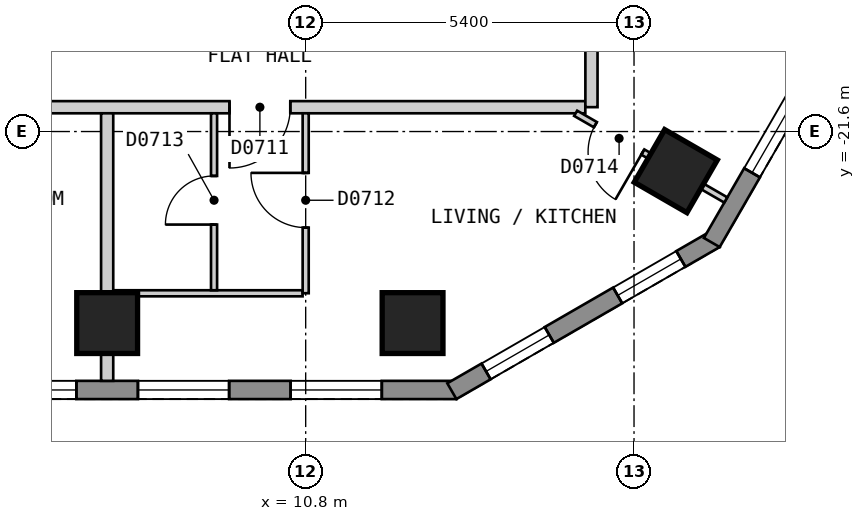
"""IFC4 building model, lengths in metres.
Left out: names, types, materials, properties, quantities, classifications, styles, units other than length and angle.
Written with IfcOpenShell. Run it as: python <this file> out.ifc"""

import sys

from ifc_helpers import new_model, si_unit, direction, frame, frame_2d, origin, origin_2d, place, context, subcontext, project, spatial, polyline, rectangle, outline, extrude, element, fill, save


model = new_model("IFC4")
c1 = context("Model", 3, precision=1e-05, world=origin(), true_north=direction((0.0, 1.0)))
c2 = subcontext(c1, "Body", "Model", "MODEL_VIEW")
j1 = project(units=[si_unit("LENGTHUNIT", "METRE"), si_unit("PLANEANGLEUNIT", "RADIAN")], contexts=[c1])
p1 = place(None, origin())
s1 = spatial("IfcSite", under=j1, at=p1, CompositionType="ELEMENT")
p2 = place(p1, origin())
s2 = spatial("IfcBuilding", under=s1, at=p2, CompositionType="ELEMENT")
p3 = place(p2, frame((0.0, 0.0, 99.0)))
s3 = spatial("IfcBuildingStorey", under=s2, at=p3, CompositionType="ELEMENT", Elevation=99.0)
for number, where, z_axis, x_axis in (
    (1, (7.535, -24.75, 0.0), (0.0, 0.0, 1.0), (1.0, 0.0, 0.0)),
    (2, (12.558, -24.75, 0.0), (0.0, 0.0, 1.0), (1.0, 0.0, 0.0)),
    (3, (16.887, -22.251, 0.0), (0.0, 0.0, 1.0), (0.5, 0.866, 0.0)),
):
    element("IfcColumn", number, at=place(p3, frame(where, z_axis=z_axis, x_axis=x_axis)), inside=s3, PredefinedType="COLUMN", context=c2, shape_type="SweptSolid", body=[
        extrude(rectangle(XDim=1.0, YDim=1.0, at=origin_2d()), origin(), (0.0, 0.0, 1.0), 3.0),
    ])
p4 = place(p3, frame((-13.279, -25.85, 0.0), z_axis=(0.0, 0.0, 1.0), x_axis=(1.0, 0.0, 0.0)))
e4 = element("IfcWall", 4, at=p4, inside=s3, PredefinedType="SOLIDWALL", context=c2, shape_type="SweptSolid", body=[
    extrude(outline(polyline([(0.0, -0.15), (26.558, -0.15), (26.478, 0.15), (0.08, 0.15), (0.0, -0.15)])), origin(), (0.0, 0.0, 1.0), 2.7),
])
p5 = place(p4, frame((1.228, 0.0, 0.15)))
e5 = element("IfcOpeningElement", 5, at=p5, cuts=e4, PredefinedType="OPENING", context=c2, shape_type="SweptSolid", body=[
    extrude(rectangle(XDim=1.5, YDim=2.1, at=frame_2d((0.75, 1.05))), frame((0.0, 0.16, 0.0), z_axis=(0.0, -1.0, 0.0), x_axis=(1.0, 0.0, 0.0)), (0.0, 0.0, 1.0), 0.32),
])
p6 = place(p4, frame((3.739, 0.0, 0.15)))
e6 = element("IfcOpeningElement", 6, at=p6, cuts=e4, PredefinedType="OPENING", context=c2, shape_type="SweptSolid", body=[
    extrude(rectangle(XDim=1.5, YDim=2.1, at=frame_2d((0.75, 1.05))), frame((0.0, 0.16, 0.0), z_axis=(0.0, -1.0, 0.0), x_axis=(1.0, 0.0, 0.0)), (0.0, 0.0, 1.0), 0.32),
])
p7 = place(p4, frame((6.251, 0.0, 0.15)))
e7 = element("IfcOpeningElement", 7, at=p7, cuts=e4, PredefinedType="OPENING", context=c2, shape_type="SweptSolid", body=[
    extrude(rectangle(XDim=1.5, YDim=2.1, at=frame_2d((0.75, 1.05))), frame((0.0, 0.16, 0.0), z_axis=(0.0, -1.0, 0.0), x_axis=(1.0, 0.0, 0.0)), (0.0, 0.0, 1.0), 0.32),
])
p8 = place(p4, frame((8.762, 0.0, 0.15)))
e8 = element("IfcOpeningElement", 8, at=p8, cuts=e4, PredefinedType="OPENING", context=c2, shape_type="SweptSolid", body=[
    extrude(rectangle(XDim=1.5, YDim=2.1, at=frame_2d((0.75, 1.05))), frame((0.0, 0.16, 0.0), z_axis=(0.0, -1.0, 0.0), x_axis=(1.0, 0.0, 0.0)), (0.0, 0.0, 1.0), 0.32),
])
p9 = place(p4, frame((11.274, 0.0, 0.15)))
e9 = element("IfcOpeningElement", 9, at=p9, cuts=e4, PredefinedType="OPENING", context=c2, shape_type="SweptSolid", body=[
    extrude(rectangle(XDim=1.5, YDim=2.1, at=frame_2d((0.75, 1.05))), frame((0.0, 0.16, 0.0), z_axis=(0.0, -1.0, 0.0), x_axis=(1.0, 0.0, 0.0)), (0.0, 0.0, 1.0), 0.32),
])
p10 = place(p4, frame((13.785, 0.0, 0.15)))
e10 = element("IfcOpeningElement", 10, at=p10, cuts=e4, PredefinedType="OPENING", context=c2, shape_type="SweptSolid", body=[
    extrude(rectangle(XDim=1.5, YDim=2.1, at=frame_2d((0.75, 1.05))), frame((0.0, 0.16, 0.0), z_axis=(0.0, -1.0, 0.0), x_axis=(1.0, 0.0, 0.0)), (0.0, 0.0, 1.0), 0.32),
])
p11 = place(p4, frame((16.297, 0.0, 0.15)))
e11 = element("IfcOpeningElement", 11, at=p11, cuts=e4, PredefinedType="OPENING", context=c2, shape_type="SweptSolid", body=[
    extrude(rectangle(XDim=1.5, YDim=2.1, at=frame_2d((0.75, 1.05))), frame((0.0, 0.16, 0.0), z_axis=(0.0, -1.0, 0.0), x_axis=(1.0, 0.0, 0.0)), (0.0, 0.0, 1.0), 0.32),
])
p12 = place(p4, frame((18.808, 0.0, 0.15)))
e12 = element("IfcOpeningElement", 12, at=p12, cuts=e4, PredefinedType="OPENING", context=c2, shape_type="SweptSolid", body=[
    extrude(rectangle(XDim=1.5, YDim=2.1, at=frame_2d((0.75, 1.05))), frame((0.0, 0.16, 0.0), z_axis=(0.0, -1.0, 0.0), x_axis=(1.0, 0.0, 0.0)), (0.0, 0.0, 1.0), 0.32),
])
p13 = place(p4, frame((21.32, 0.0, 0.15)))
e13 = element("IfcOpeningElement", 13, at=p13, cuts=e4, PredefinedType="OPENING", context=c2, shape_type="SweptSolid", body=[
    extrude(rectangle(XDim=1.5, YDim=2.1, at=frame_2d((0.75, 1.05))), frame((0.0, 0.16, 0.0), z_axis=(0.0, -1.0, 0.0), x_axis=(1.0, 0.0, 0.0)), (0.0, 0.0, 1.0), 0.32),
])
p14 = place(p4, frame((23.831, 0.0, 0.15)))
e14 = element("IfcOpeningElement", 14, at=p14, cuts=e4, PredefinedType="OPENING", context=c2, shape_type="SweptSolid", body=[
    extrude(rectangle(XDim=1.5, YDim=2.1, at=frame_2d((0.75, 1.05))), frame((0.0, 0.16, 0.0), z_axis=(0.0, -1.0, 0.0), x_axis=(1.0, 0.0, 0.0)), (0.0, 0.0, 1.0), 0.32),
])
p15 = place(p3, frame((13.204, -25.87, 0.0), z_axis=(0.0, 0.0, 1.0), x_axis=(0.866010750942, 0.50002537861, 0.0)))
e15 = element("IfcWall", 15, at=p15, inside=s3, PredefinedType="SOLIDWALL", context=c2, shape_type="SweptSolid", body=[
    extrude(outline(polyline([(0.0, -0.15), (5.0, -0.15), (4.919, 0.15), (0.08, 0.15), (0.0, -0.15)])), origin(), (0.0, 0.0, 1.0), 2.7),
])
p16 = place(p15, frame((0.65, 0.0, 0.15)))
e16 = element("IfcOpeningElement", 16, at=p16, cuts=e15, PredefinedType="OPENING", context=c2, shape_type="SweptSolid", body=[
    extrude(rectangle(XDim=1.2, YDim=2.1, at=frame_2d((0.6, 1.05))), frame((0.0, 0.16, 0.0), z_axis=(0.0, -1.0, 0.0), x_axis=(1.0, 0.0, 0.0)), (0.0, 0.0, 1.0), 0.32),
])
p17 = place(p15, frame((3.149, 0.0, 0.15)))
e17 = element("IfcOpeningElement", 17, at=p17, cuts=e15, PredefinedType="OPENING", context=c2, shape_type="SweptSolid", body=[
    extrude(rectangle(XDim=1.2, YDim=2.1, at=frame_2d((0.6, 1.05))), frame((0.0, 0.16, 0.0), z_axis=(0.0, -1.0, 0.0), x_axis=(1.0, 0.0, 0.0)), (0.0, 0.0, 1.0), 0.32),
])
p18 = place(p3, frame((17.479, -23.425, 0.0), z_axis=(0.0, 0.0, 1.0), x_axis=(0.500035407905, 0.866004960056, 0.0)))
e18 = element("IfcWall", 18, at=p18, inside=s3, PredefinedType="SOLIDWALL", context=c2, shape_type="SweptSolid", body=[
    extrude(outline(polyline([(0.0, -0.15), (23.094, -0.15), (23.014, 0.15), (0.08, 0.15), (0.0, -0.15)])), origin(), (0.0, 0.0, 1.0), 2.7),
])
p19 = place(p18, frame((1.324, 0.0, 0.15)))
e19 = element("IfcOpeningElement", 19, at=p19, cuts=e18, PredefinedType="OPENING", context=c2, shape_type="SweptSolid", body=[
    extrude(rectangle(XDim=1.5, YDim=2.1, at=frame_2d((0.75, 1.05))), frame((0.0, 0.16, 0.0), z_axis=(0.0, -1.0, 0.0), x_axis=(1.0, 0.0, 0.0)), (0.0, 0.0, 1.0), 0.32),
])
p20 = place(p18, frame((4.031, 0.0, 0.15)))
e20 = element("IfcOpeningElement", 20, at=p20, cuts=e18, PredefinedType="OPENING", context=c2, shape_type="SweptSolid", body=[
    extrude(rectangle(XDim=1.5, YDim=2.1, at=frame_2d((0.75, 1.05))), frame((0.0, 0.16, 0.0), z_axis=(0.0, -1.0, 0.0), x_axis=(1.0, 0.0, 0.0)), (0.0, 0.0, 1.0), 0.32),
])
p21 = place(p18, frame((6.737, 0.0, 0.15)))
e21 = element("IfcOpeningElement", 21, at=p21, cuts=e18, PredefinedType="OPENING", context=c2, shape_type="SweptSolid", body=[
    extrude(rectangle(XDim=1.5, YDim=2.1, at=frame_2d((0.75, 1.05))), frame((0.0, 0.16, 0.0), z_axis=(0.0, -1.0, 0.0), x_axis=(1.0, 0.0, 0.0)), (0.0, 0.0, 1.0), 0.32),
])
p22 = place(p18, frame((9.444, 0.0, 0.15)))
e22 = element("IfcOpeningElement", 22, at=p22, cuts=e18, PredefinedType="OPENING", context=c2, shape_type="SweptSolid", body=[
    extrude(rectangle(XDim=1.5, YDim=2.1, at=frame_2d((0.75, 1.05))), frame((0.0, 0.16, 0.0), z_axis=(0.0, -1.0, 0.0), x_axis=(1.0, 0.0, 0.0)), (0.0, 0.0, 1.0), 0.32),
])
p23 = place(p18, frame((12.151, 0.0, 0.15)))
e23 = element("IfcOpeningElement", 23, at=p23, cuts=e18, PredefinedType="OPENING", context=c2, shape_type="SweptSolid", body=[
    extrude(rectangle(XDim=1.5, YDim=2.1, at=frame_2d((0.75, 1.05))), frame((0.0, 0.16, 0.0), z_axis=(0.0, -1.0, 0.0), x_axis=(1.0, 0.0, 0.0)), (0.0, 0.0, 1.0), 0.32),
])
p24 = place(p18, frame((14.857, 0.0, 0.15)))
e24 = element("IfcOpeningElement", 24, at=p24, cuts=e18, PredefinedType="OPENING", context=c2, shape_type="SweptSolid", body=[
    extrude(rectangle(XDim=1.5, YDim=2.1, at=frame_2d((0.75, 1.05))), frame((0.0, 0.16, 0.0), z_axis=(0.0, -1.0, 0.0), x_axis=(1.0, 0.0, 0.0)), (0.0, 0.0, 1.0), 0.32),
])
p25 = place(p18, frame((17.564, 0.0, 0.15)))
e25 = element("IfcOpeningElement", 25, at=p25, cuts=e18, PredefinedType="OPENING", context=c2, shape_type="SweptSolid", body=[
    extrude(rectangle(XDim=1.5, YDim=2.1, at=frame_2d((0.75, 1.05))), frame((0.0, 0.16, 0.0), z_axis=(0.0, -1.0, 0.0), x_axis=(1.0, 0.0, 0.0)), (0.0, 0.0, 1.0), 0.32),
])
p26 = place(p18, frame((20.271, 0.0, 0.15)))
e26 = element("IfcOpeningElement", 26, at=p26, cuts=e18, PredefinedType="OPENING", context=c2, shape_type="SweptSolid", body=[
    extrude(rectangle(XDim=1.5, YDim=2.1, at=frame_2d((0.75, 1.05))), frame((0.0, 0.16, 0.0), z_axis=(0.0, -1.0, 0.0), x_axis=(1.0, 0.0, 0.0)), (0.0, 0.0, 1.0), 0.32),
])
p27 = place(p3, frame((-15.499, -21.2, 0.0), z_axis=(0.0, 0.0, 1.0), x_axis=(1.0, 0.0, 0.0)))
e27 = element("IfcWall", 27, at=p27, inside=s3, PredefinedType="PARTITIONING", context=c2, shape_type="SweptSolid", body=[
    extrude(rectangle(XDim=30.898, YDim=0.2, at=frame_2d((15.449, 0.0))), origin(), (0.0, 0.0, 1.0), 2.7),
])
p28 = place(p27, frame((9.977, 0.0, 0.0)))
e28 = element("IfcOpeningElement", 28, at=p28, cuts=e27, PredefinedType="OPENING", context=c2, shape_type="SweptSolid", body=[
    extrude(rectangle(XDim=1.0, YDim=2.1, at=frame_2d((0.5, 1.05))), frame((0.0, 0.11, 0.0), z_axis=(0.0, -1.0, 0.0), x_axis=(1.0, 0.0, 0.0)), (0.0, 0.0, 1.0), 0.22),
])
p29 = place(p27, frame((25.046, 0.0, 0.0)))
e29 = element("IfcOpeningElement", 29, at=p29, cuts=e27, PredefinedType="OPENING", context=c2, shape_type="SweptSolid", body=[
    extrude(rectangle(XDim=1.0, YDim=2.1, at=frame_2d((0.5, 1.05))), frame((0.0, 0.11, 0.0), z_axis=(0.0, -1.0, 0.0), x_axis=(1.0, 0.0, 0.0)), (0.0, 0.0, 1.0), 0.22),
])
p30 = place(p3, frame((15.5, -21.199, 0.0), z_axis=(0.0, 0.0, 1.0), x_axis=(0.0, 1.0, 0.0)))
e30 = element("IfcWall", 30, at=p30, inside=s3, PredefinedType="PARTITIONING", context=c2, shape_type="SweptSolid", body=[
    extrude(rectangle(XDim=10.483, YDim=0.2, at=frame_2d((5.241, 0.0))), origin(), (0.0, 0.0, 1.0), 2.7),
])
p31 = place(p3, frame((15.24, -21.3, 0.0), z_axis=(0.0, 0.0, 1.0), x_axis=(0.866090043625, -0.499888023795, 0.0)))
e31 = element("IfcWall", 31, at=p31, inside=s3, PredefinedType="PARTITIONING", context=c2, shape_type="SweptSolid", body=[
    extrude(rectangle(XDim=2.851, YDim=0.1, at=frame_2d((1.425, 0.0))), origin(), (0.0, 0.0, 1.0), 2.7),
])
p32 = place(p31, frame((0.375, 0.0, 0.0)))
e32 = element("IfcOpeningElement", 32, at=p32, cuts=e31, PredefinedType="OPENING", context=c2, shape_type="SweptSolid", body=[
    extrude(rectangle(XDim=0.9, YDim=2.1, at=frame_2d((0.45, 1.05))), frame((0.0, 0.06, 0.0), z_axis=(0.0, -1.0, 0.0), x_axis=(1.0, 0.0, 0.0)), (0.0, 0.0, 1.0), 0.12),
])
p33 = place(p3, frame((7.635, -24.26, 0.0), z_axis=(0.0, 0.0, 1.0), x_axis=(1.0, 0.0, 0.0)))
e33 = element("IfcWall", 33, at=p33, inside=s3, PredefinedType="PARTITIONING", context=c2, shape_type="SweptSolid", body=[
    extrude(rectangle(XDim=3.114, YDim=0.1, at=frame_2d((1.557, 0.0))), origin(), (0.0, 0.0, 1.0), 2.7),
])
p34 = place(p3, frame((9.293, -24.21, 0.0), z_axis=(0.0, 0.0, 1.0), x_axis=(0.0, 1.0, 0.0)))
e34 = element("IfcWall", 34, at=p34, inside=s3, PredefinedType="PARTITIONING", context=c2, shape_type="SweptSolid", body=[
    extrude(rectangle(XDim=2.91, YDim=0.1, at=frame_2d((1.455, 0.0))), origin(), (0.0, 0.0, 1.0), 2.7),
])
p35 = place(p34, frame((1.08, 0.0, 0.0)))
e35 = element("IfcOpeningElement", 35, at=p35, cuts=e34, PredefinedType="OPENING", context=c2, shape_type="SweptSolid", body=[
    extrude(rectangle(XDim=0.8, YDim=2.1, at=frame_2d((0.4, 1.05))), frame((0.0, 0.06, 0.0), z_axis=(0.0, -1.0, 0.0), x_axis=(1.0, 0.0, 0.0)), (0.0, 0.0, 1.0), 0.12),
])
p36 = place(p3, frame((10.8, -24.259, 0.0), z_axis=(0.0, 0.0, 1.0), x_axis=(0.0, 1.0, 0.0)))
e36 = element("IfcWall", 36, at=p36, inside=s3, PredefinedType="PARTITIONING", context=c2, shape_type="SweptSolid", body=[
    extrude(rectangle(XDim=2.959, YDim=0.1, at=frame_2d((1.479, 0.0))), origin(), (0.0, 0.0, 1.0), 2.7),
])
p37 = place(p36, frame((1.079, 0.0, 0.0)))
e37 = element("IfcOpeningElement", 37, at=p37, cuts=e36, PredefinedType="OPENING", context=c2, shape_type="SweptSolid", body=[
    extrude(rectangle(XDim=0.9, YDim=2.1, at=frame_2d((0.45, 1.05))), frame((0.0, 0.06, 0.0), z_axis=(0.0, -1.0, 0.0), x_axis=(1.0, 0.0, 0.0)), (0.0, 0.0, 1.0), 0.12),
])
p38 = place(p3, frame((7.535, -21.3, 0.0), z_axis=(0.0, 0.0, 1.0), x_axis=(0.0, -1.0, 0.0)))
e38 = element("IfcWall", 38, at=p38, inside=s3, PredefinedType="PARTITIONING", context=c2, shape_type="SweptSolid", body=[
    extrude(rectangle(XDim=2.98, YDim=0.2, at=frame_2d((1.49, 0.0))), origin(), (0.0, 0.0, 1.0), 2.7),
])
p39 = place(p3, frame((7.535, -25.7, 0.0), z_axis=(0.0, 0.0, 1.0), x_axis=(0.0, 1.0, 0.0)))
e39 = element("IfcWall", 39, at=p39, inside=s3, PredefinedType="PARTITIONING", context=c2, shape_type="SweptSolid", body=[
    extrude(rectangle(XDim=1.46, YDim=0.2, at=frame_2d((0.73, 0.0))), origin(), (0.0, 0.0, 1.0), 2.7),
])
p40 = place(p12, origin())
e40 = element("IfcWindow", 40, at=p40, inside=s3, PartitioningType="SINGLE_PANEL", PredefinedType="WINDOW", context=c2, shape_type="SweptSolid", body=[
    extrude(rectangle(XDim=1.5, YDim=2.1, at=frame_2d((0.75, 1.05))), frame((0.0, 0.03, 0.0), z_axis=(0.0, -1.0, 0.0), x_axis=(1.0, 0.0, 0.0)), (0.0, 0.0, 1.0), 0.06),
])
fill(e12, e40)
p41 = place(p13, origin())
e41 = element("IfcWindow", 41, at=p41, inside=s3, PartitioningType="SINGLE_PANEL", PredefinedType="WINDOW", context=c2, shape_type="SweptSolid", body=[
    extrude(rectangle(XDim=1.5, YDim=2.1, at=frame_2d((0.75, 1.05))), frame((0.0, 0.03, 0.0), z_axis=(0.0, -1.0, 0.0), x_axis=(1.0, 0.0, 0.0)), (0.0, 0.0, 1.0), 0.06),
])
fill(e13, e41)
p42 = place(p14, origin())
e42 = element("IfcWindow", 42, at=p42, inside=s3, PartitioningType="SINGLE_PANEL", PredefinedType="WINDOW", context=c2, shape_type="SweptSolid", body=[
    extrude(rectangle(XDim=1.5, YDim=2.1, at=frame_2d((0.75, 1.05))), frame((0.0, 0.03, 0.0), z_axis=(0.0, -1.0, 0.0), x_axis=(1.0, 0.0, 0.0)), (0.0, 0.0, 1.0), 0.06),
])
fill(e14, e42)
p43 = place(p16, origin())
e43 = element("IfcWindow", 43, at=p43, inside=s3, PartitioningType="SINGLE_PANEL", PredefinedType="WINDOW", context=c2, shape_type="SweptSolid", body=[
    extrude(rectangle(XDim=1.2, YDim=2.1, at=frame_2d((0.6, 1.05))), frame((0.0, 0.03, 0.0), z_axis=(0.0, -1.0, 0.0), x_axis=(1.0, 0.0, 0.0)), (0.0, 0.0, 1.0), 0.06),
])
fill(e16, e43)
p44 = place(p17, origin())
e44 = element("IfcWindow", 44, at=p44, inside=s3, PartitioningType="SINGLE_PANEL", PredefinedType="WINDOW", context=c2, shape_type="SweptSolid", body=[
    extrude(rectangle(XDim=1.2, YDim=2.1, at=frame_2d((0.6, 1.05))), frame((0.0, 0.03, 0.0), z_axis=(0.0, -1.0, 0.0), x_axis=(1.0, 0.0, 0.0)), (0.0, 0.0, 1.0), 0.06),
])
fill(e17, e44)
p45 = place(p19, origin())
e45 = element("IfcWindow", 45, at=p45, inside=s3, PartitioningType="SINGLE_PANEL", PredefinedType="WINDOW", context=c2, shape_type="SweptSolid", body=[
    extrude(rectangle(XDim=1.5, YDim=2.1, at=frame_2d((0.75, 1.05))), frame((0.0, 0.03, 0.0), z_axis=(0.0, -1.0, 0.0), x_axis=(1.0, 0.0, 0.0)), (0.0, 0.0, 1.0), 0.06),
])
fill(e19, e45)
p46 = place(p29, origin())
e46 = element("IfcDoor", 46, at=p46, inside=s3, OperationType="SINGLE_SWING_LEFT", PredefinedType="DOOR", context=c2, shape_type="SweptSolid", body=[
    extrude(rectangle(XDim=1.0, YDim=2.1, at=frame_2d((0.5, 1.05))), frame((0.0, 0.025, 0.0), z_axis=(0.0, -1.0, 0.0), x_axis=(1.0, 0.0, 0.0)), (0.0, 0.0, 1.0), 0.05),
])
fill(e29, e46)
p47 = place(p37, origin())
e47 = element("IfcDoor", 47, at=p47, inside=s3, OperationType="SINGLE_SWING_RIGHT", PredefinedType="DOOR", context=c2, shape_type="SweptSolid", body=[
    extrude(rectangle(XDim=0.9, YDim=2.1, at=frame_2d((0.45, 1.05))), frame((0.0, 0.025, 0.0), z_axis=(0.0, -1.0, 0.0), x_axis=(1.0, 0.0, 0.0)), (0.0, 0.0, 1.0), 0.05),
])
fill(e37, e47)
p48 = place(p35, origin())
e48 = element("IfcDoor", 48, at=p48, inside=s3, OperationType="SINGLE_SWING_LEFT", PredefinedType="DOOR", context=c2, shape_type="SweptSolid", body=[
    extrude(rectangle(XDim=0.8, YDim=2.1, at=frame_2d((0.4, 1.05))), frame((0.0, 0.025, 0.0), z_axis=(0.0, -1.0, 0.0), x_axis=(1.0, 0.0, 0.0)), (0.0, 0.0, 1.0), 0.05),
])
fill(e35, e48)
p49 = place(p32, origin())
e49 = element("IfcDoor", 49, at=p49, inside=s3, OperationType="SINGLE_SWING_RIGHT", PredefinedType="DOOR", context=c2, shape_type="SweptSolid", body=[
    extrude(rectangle(XDim=0.9, YDim=2.1, at=frame_2d((0.45, 1.05))), frame((0.0, 0.025, 0.0), z_axis=(0.0, -1.0, 0.0), x_axis=(1.0, 0.0, 0.0)), (0.0, 0.0, 1.0), 0.05),
])
fill(e32, e49)
save(model, sys.argv[1])
